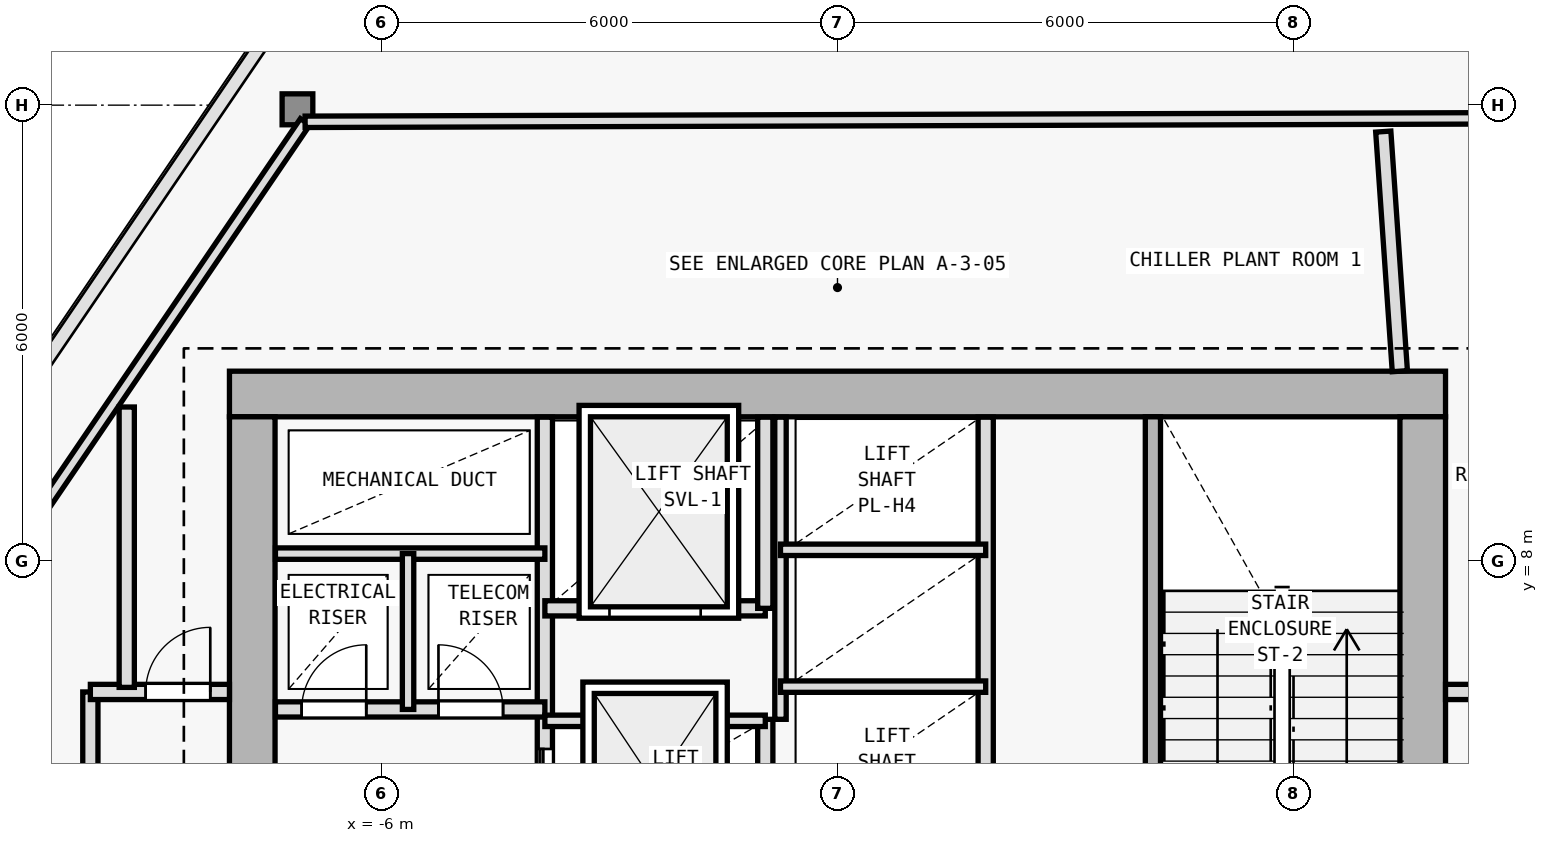
"""IFC4 building model, lengths in metres.
Left out: names, types, materials, properties, quantities, classifications, styles, units other than length and angle.
Written with IfcOpenShell. Run it as: python <this file> out.ifc"""

import sys

from ifc_helpers import new_model, si_unit, direction, frame, frame_2d, origin, origin_2d, place, context, subcontext, project, spatial, rectangle, i_section, extrude, element, fill, save


model = new_model("IFC4")
c1 = context("Model", 3, precision=1e-05, world=origin(), true_north=direction((0.0, 1.0)))
c2 = subcontext(c1, "Body", "Model", "MODEL_VIEW")
j1 = project(units=[si_unit("LENGTHUNIT", "METRE"), si_unit("PLANEANGLEUNIT", "RADIAN")], contexts=[c1])
p1 = place(None, origin())
s1 = spatial("IfcSite", under=j1, at=p1, CompositionType="ELEMENT")
p2 = place(p1, origin())
s2 = spatial("IfcBuilding", under=s1, at=p2, CompositionType="ELEMENT")
p3 = place(p2, frame((0.0, 0.0, 129.3)))
s3 = spatial("IfcBuildingStorey", under=s2, at=p3, CompositionType="ELEMENT", Elevation=129.3)
for number, where, z_axis, x_axis in (
    (1, (7.7, 10.2, 0.0), (0.0, 0.0, 1.0), (1.0, 0.0, 0.0)),
    (2, (-7.7, 10.2, 0.0), (0.0, 0.0, 1.0), (1.0, 0.0, 0.0)),
):
    element("IfcColumn", number, at=place(p3, frame(where, z_axis=z_axis, x_axis=x_axis)), inside=s3, PredefinedType="COLUMN", context=c2, shape_type="SweptSolid", body=[
        extrude(i_section(OverallWidth=0.409, OverallDepth=0.425, WebThickness=0.021, FlangeThickness=0.034, FilletRadius=0.015, at=origin_2d()), origin(), (0.0, 0.0, 1.0), 4.8),
    ])
p4 = place(p3, frame((-7.105, 13.945, 0.005), z_axis=(0.006576109737, -0.001937148605, 0.999976500842), x_axis=(0.282568886397, 0.959247009086, 0.0)))
e3 = element("IfcColumn", 3, at=p4, inside=s3, PredefinedType="COLUMN", context=c2, shape_type="SweptSolid", body=[
    extrude(i_section(OverallWidth=0.404, OverallDepth=0.407, WebThickness=0.017, FlangeThickness=0.028, FilletRadius=0.015, at=origin_2d()), origin(), (0.0, 0.0, 1.0), 4.789),
])
p5 = place(p3, frame((8.0, 10.2, 0.0), z_axis=(0.0, 0.0, 1.0), x_axis=(-1.0, 0.0, 0.0)))
e4 = element("IfcWall", 4, at=p5, inside=s3, PredefinedType="SHEAR", context=c2, shape_type="SweptSolid", body=[
    extrude(rectangle(XDim=16.0, YDim=0.6, at=frame_2d((8.0, 0.0))), origin(), (0.0, 0.0, 1.0), 4.5),
])
p6 = place(p3, frame((-7.7, -9.1, 0.0), z_axis=(0.0, 0.0, 1.0), x_axis=(0.0, 1.0, 0.0)))
e5 = element("IfcWall", 5, at=p6, inside=s3, PredefinedType="SHEAR", context=c2, shape_type="SweptSolid", body=[
    extrude(rectangle(XDim=19.0, YDim=0.6, at=frame_2d((9.5, 0.0))), origin(), (0.0, 0.0, 1.0), 4.5),
])
p7 = place(p6, frame((12.65, 0.0, 0.0)))
e6 = element("IfcOpeningElement", 6, at=p7, cuts=e5, PredefinedType="OPENING", context=c2, shape_type="SweptSolid", body=[
    extrude(rectangle(XDim=1.1, YDim=2.15, at=frame_2d((0.55, 1.075))), frame((0.0, 0.31, 0.0), z_axis=(0.0, -1.0, 0.0), x_axis=(1.0, 0.0, 0.0)), (0.0, 0.0, 1.0), 0.62),
])
p8 = place(p3, frame((7.7, 9.9, 0.0), z_axis=(0.0, 0.0, 1.0), x_axis=(0.0, -1.0, 0.0)))
e7 = element("IfcWall", 7, at=p8, inside=s3, PredefinedType="SHEAR", context=c2, shape_type="SweptSolid", body=[
    extrude(rectangle(XDim=19.0, YDim=0.6, at=frame_2d((9.5, 0.0))), origin(), (0.0, 0.0, 1.0), 4.5),
])
p9 = place(p3, frame((-3.85, 1.35, 0.0), z_axis=(0.0, 0.0, 1.0), x_axis=(0.0, 1.0, 0.0)))
e8 = element("IfcWall", 8, at=p9, inside=s3, PredefinedType="SOLIDWALL", context=c2, shape_type="SweptSolid", body=[
    extrude(rectangle(XDim=8.545, YDim=0.2, at=frame_2d((4.272, 0.0))), origin(), (0.0, 0.0, 1.0), 4.5),
])
p10 = place(p9, frame((1.5, 0.0, 0.0)))
e9 = element("IfcOpeningElement", 9, at=p10, cuts=e8, PredefinedType="OPENING", context=c2, shape_type="SweptSolid", body=[
    extrude(rectangle(XDim=1.0, YDim=2.15, at=frame_2d((0.5, 1.075))), frame((0.0, 0.11, 0.0), z_axis=(0.0, -1.0, 0.0), x_axis=(1.0, 0.0, 0.0)), (0.0, 0.0, 1.0), 0.22),
])
p11 = place(p9, frame((3.18, 0.0, 0.0)))
e10 = element("IfcOpeningElement", 10, at=p11, cuts=e8, PredefinedType="OPENING", context=c2, shape_type="SweptSolid", body=[
    extrude(rectangle(XDim=1.0, YDim=2.15, at=frame_2d((0.5, 1.075))), frame((0.0, 0.11, 0.0), z_axis=(0.0, -1.0, 0.0), x_axis=(1.0, 0.0, 0.0)), (0.0, 0.0, 1.0), 0.22),
])
p12 = place(p3, frame((-7.395, 6.05, 0.0), z_axis=(0.0, 0.0, 1.0), x_axis=(1.0, 0.0, 0.0)))
e11 = element("IfcWall", 11, at=p12, inside=s3, PredefinedType="SOLIDWALL", context=c2, shape_type="SweptSolid", body=[
    extrude(rectangle(XDim=3.545, YDim=0.2, at=frame_2d((1.772, 0.0))), origin(), (0.0, 0.0, 1.0), 4.5),
])
p13 = place(p12, frame((0.345, 0.0, 0.0)))
e12 = element("IfcOpeningElement", 12, at=p13, cuts=e11, PredefinedType="OPENING", context=c2, shape_type="SweptSolid", body=[
    extrude(rectangle(XDim=0.85, YDim=2.1, at=frame_2d((0.425, 1.05))), frame((0.0, 0.11, 0.0), z_axis=(0.0, -1.0, 0.0), x_axis=(1.0, 0.0, 0.0)), (0.0, 0.0, 1.0), 0.22),
])
p14 = place(p12, frame((2.145, 0.0, 0.0)))
e13 = element("IfcOpeningElement", 13, at=p14, cuts=e11, PredefinedType="OPENING", context=c2, shape_type="SweptSolid", body=[
    extrude(rectangle(XDim=0.85, YDim=2.1, at=frame_2d((0.425, 1.05))), frame((0.0, 0.11, 0.0), z_axis=(0.0, -1.0, 0.0), x_axis=(1.0, 0.0, 0.0)), (0.0, 0.0, 1.0), 0.22),
])
p15 = place(p3, frame((-7.395, 8.1, 0.0), z_axis=(0.0, 0.0, 1.0), x_axis=(1.0, 0.0, 0.0)))
e14 = element("IfcWall", 14, at=p15, inside=s3, PredefinedType="PARTITIONING", context=c2, shape_type="SweptSolid", body=[
    extrude(rectangle(XDim=3.545, YDim=0.15, at=frame_2d((1.772, 0.0))), origin(), (0.0, 0.0, 1.0), 4.5),
])
p16 = place(p3, frame((-5.65, 6.05, 0.0), z_axis=(0.0, 0.0, 1.0), x_axis=(0.0, 1.0, 0.0)))
e15 = element("IfcWall", 15, at=p16, inside=s3, PredefinedType="PARTITIONING", context=c2, shape_type="SweptSolid", body=[
    extrude(rectangle(XDim=2.05, YDim=0.15, at=frame_2d((1.025, 0.0))), origin(), (0.0, 0.0, 1.0), 4.5),
])
p17 = place(p3, frame((4.15, 2.75, 0.0), z_axis=(0.0, 0.0, 1.0), x_axis=(0.0, 1.0, 0.0)))
e16 = element("IfcWall", 16, at=p17, inside=s3, PredefinedType="SOLIDWALL", context=c2, shape_type="SweptSolid", body=[
    extrude(rectangle(XDim=7.15, YDim=0.2, at=frame_2d((3.575, 0.0))), origin(), (0.0, 0.0, 1.0), 4.5),
])
p18 = place(p17, frame((0.35, 0.0, 0.0)))
e17 = element("IfcOpeningElement", 17, at=p18, cuts=e16, PredefinedType="OPENING", context=c2, shape_type="SweptSolid", body=[
    extrude(rectangle(XDim=1.0, YDim=2.15, at=frame_2d((0.5, 1.075))), frame((0.0, 0.11, 0.0), z_axis=(0.0, -1.0, 0.0), x_axis=(1.0, 0.0, 0.0)), (0.0, 0.0, 1.0), 0.22),
])
p19 = place(p3, frame((-0.95, 2.65, 0.0), z_axis=(0.0, 0.0, 1.0), x_axis=(0.0, 1.0, 0.0)))
e18 = element("IfcWall", 18, at=p19, inside=s3, PredefinedType="SOLIDWALL", context=c2, shape_type="SweptSolid", body=[
    extrude(rectangle(XDim=3.27, YDim=0.2, at=frame_2d((1.635, 0.0))), origin(), (0.0, 0.0, 1.0), 4.5),
])
p20 = place(p3, frame((-3.85, 5.9, 0.0), z_axis=(0.0, 0.0, 1.0), x_axis=(1.0, 0.0, 0.0)))
e19 = element("IfcWall", 19, at=p20, inside=s3, PredefinedType="PARTITIONING", context=c2, shape_type="SweptSolid", body=[
    extrude(rectangle(XDim=2.9, YDim=0.15, at=frame_2d((1.45, 0.0))), origin(), (0.0, 0.0, 1.0), 4.5),
])
p21 = place(p3, frame((-3.85, 7.38, 0.0), z_axis=(0.0, 0.0, 1.0), x_axis=(1.0, 0.0, 0.0)))
e20 = element("IfcWall", 20, at=p21, inside=s3, PredefinedType="SOLIDWALL", context=c2, shape_type="SweptSolid", body=[
    extrude(rectangle(XDim=2.9, YDim=0.2, at=frame_2d((1.45, 0.0))), origin(), (0.0, 0.0, 1.0), 4.5),
])
p22 = place(p21, frame((0.85, 0.0, 0.0)))
e21 = element("IfcOpeningElement", 21, at=p22, cuts=e20, PredefinedType="OPENING", context=c2, shape_type="SweptSolid", body=[
    extrude(rectangle(XDim=1.2, YDim=2.2, at=frame_2d((0.6, 1.1))), frame((0.0, 0.11, 0.0), z_axis=(0.0, -1.0, 0.0), x_axis=(1.0, 0.0, 0.0)), (0.0, 0.0, 1.0), 0.22),
])
p23 = place(p3, frame((-0.95, 7.38, 0.0), z_axis=(0.0, 0.0, 1.0), x_axis=(0.0, 1.0, 0.0)))
e22 = element("IfcWall", 22, at=p23, inside=s3, PredefinedType="SOLIDWALL", context=c2, shape_type="SweptSolid", body=[
    extrude(rectangle(XDim=2.515, YDim=0.2, at=frame_2d((1.258, 0.0))), origin(), (0.0, 0.0, 1.0), 4.5),
])
p24 = place(p3, frame((1.95, 2.65, 0.0), z_axis=(0.0, 0.0, 1.0), x_axis=(0.0, 1.0, 0.0)))
e23 = element("IfcWall", 23, at=p24, inside=s3, PredefinedType="SOLIDWALL", context=c2, shape_type="SweptSolid", body=[
    extrude(rectangle(XDim=7.245, YDim=0.2, at=frame_2d((3.623, 0.0))), origin(), (0.0, 0.0, 1.0), 4.5),
])
p25 = place(p3, frame((-0.75, 5.92, 0.0), z_axis=(0.0, 0.0, 1.0), x_axis=(0.0, 1.0, 0.0)))
e24 = element("IfcWall", 24, at=p25, inside=s3, PredefinedType="PARTITIONING", context=c2, shape_type="SweptSolid", body=[
    extrude(rectangle(XDim=3.975, YDim=0.15, at=frame_2d((1.988, 0.0))), origin(), (0.0, 0.0, 1.0), 4.5),
])
for number, where, z_axis, x_axis in (
    (25, (-0.75, 6.35, 0.0), (0.0, 0.0, 1.0), (1.0, 0.0, 0.0)),
    (26, (-0.75, 8.15, 0.0), (0.0, 0.0, 1.0), (1.0, 0.0, 0.0)),
):
    element("IfcWall", number, at=place(p3, frame(where, z_axis=z_axis, x_axis=x_axis)), inside=s3, PredefinedType="PARTITIONING", context=c2, shape_type="SweptSolid", body=[
        extrude(rectangle(XDim=2.7, YDim=0.15, at=frame_2d((1.35, 0.0))), origin(), (0.0, 0.0, 1.0), 4.5),
    ])
p26 = place(p3, frame((-14.31, 3.042, 0.0), z_axis=(0.0, 0.0, 1.0), x_axis=(0.562466830755, 0.826819849968, 0.0)))
e27 = element("IfcWall", 27, at=p26, inside=s3, PredefinedType="PARTITIONING", context=c2, shape_type="SweptSolid", body=[
    extrude(rectangle(XDim=12.988, YDim=0.15, at=frame_2d((6.494, 0.0))), origin(), (0.0, 0.0, 1.0), 4.035),
])
p27 = place(p3, frame((-7.004, 13.781, 0.0), z_axis=(0.0, 0.0, 1.0), x_axis=(0.999995800217, 0.002898197411, 0.0)))
e28 = element("IfcWall", 28, at=p27, inside=s3, PredefinedType="PARTITIONING", context=c2, shape_type="SweptSolid", body=[
    extrude(rectangle(XDim=16.595, YDim=0.15, at=frame_2d((8.297, 0.0))), origin(), (0.0, 0.0, 1.0), 4.035),
])
p28 = place(p3, frame((-9.83, -11.53, 0.0), z_axis=(0.0, 0.0, 1.0), x_axis=(0.0, 1.0, 0.0)))
e29 = element("IfcWall", 29, at=p28, inside=s3, PredefinedType="SOLIDWALL", context=c2, shape_type="SweptSolid", body=[
    extrude(rectangle(XDim=17.81, YDim=0.2, at=frame_2d((8.905, 0.0))), origin(), (0.0, 0.0, 1.0), 3.875),
])
p29 = place(p28, frame((4.492, 0.0, 0.0)))
e30 = element("IfcOpeningElement", 30, at=p29, cuts=e29, PredefinedType="OPENING", context=c2, shape_type="SweptSolid", body=[
    extrude(rectangle(XDim=1.0, YDim=2.15, at=frame_2d((0.5, 1.075))), frame((0.0, 0.11, 0.0), z_axis=(0.0, -1.0, 0.0), x_axis=(1.0, 0.0, 0.0)), (0.0, 0.0, 1.0), 0.22),
])
p30 = place(p28, frame((13.244, 0.0, 0.0)))
e31 = element("IfcOpeningElement", 31, at=p30, cuts=e29, PredefinedType="OPENING", context=c2, shape_type="SweptSolid", body=[
    extrude(rectangle(XDim=1.0, YDim=2.15, at=frame_2d((0.5, 1.075))), frame((0.0, 0.11, 0.0), z_axis=(0.0, -1.0, 0.0), x_axis=(1.0, 0.0, 0.0)), (0.0, 0.0, 1.0), 0.22),
])
p31 = place(p3, frame((-9.83, 6.28, 0.0), z_axis=(0.0, 0.0, 1.0), x_axis=(1.0, 0.0, 0.0)))
e32 = element("IfcWall", 32, at=p31, inside=s3, PredefinedType="SOLIDWALL", context=c2, shape_type="SweptSolid", body=[
    extrude(rectangle(XDim=1.83, YDim=0.2, at=frame_2d((0.915, 0.0))), origin(), (0.0, 0.0, 1.0), 4.175),
])
p32 = place(p31, frame((0.728, 0.0, 0.0)))
e33 = element("IfcOpeningElement", 33, at=p32, cuts=e32, PredefinedType="OPENING", context=c2, shape_type="SweptSolid", body=[
    extrude(rectangle(XDim=0.85, YDim=2.1, at=frame_2d((0.425, 1.05))), frame((0.0, 0.11, 0.0), z_axis=(0.0, -1.0, 0.0), x_axis=(1.0, 0.0, 0.0)), (0.0, 0.0, 1.0), 0.22),
])
p33 = place(p3, frame((8.0, 6.28, 0.0), z_axis=(0.0, 0.0, 1.0), x_axis=(1.0, 0.0, 0.0)))
e34 = element("IfcWall", 34, at=p33, inside=s3, PredefinedType="SOLIDWALL", context=c2, shape_type="SweptSolid", body=[
    extrude(rectangle(XDim=1.83, YDim=0.2, at=frame_2d((0.915, 0.0))), origin(), (0.0, 0.0, 1.0), 4.5),
])
p34 = place(p33, frame((0.365, 0.0, 0.0)))
e35 = element("IfcOpeningElement", 35, at=p34, cuts=e34, PredefinedType="OPENING", context=c2, shape_type="SweptSolid", body=[
    extrude(rectangle(XDim=0.85, YDim=2.1, at=frame_2d((0.425, 1.05))), frame((0.0, 0.11, 0.0), z_axis=(0.0, -1.0, 0.0), x_axis=(1.0, 0.0, 0.0)), (0.0, 0.0, 1.0), 0.22),
])
p35 = place(p3, frame((7.399, 10.5, 0.0), z_axis=(0.0, 0.0, 1.0), x_axis=(-0.06892407576, 0.99762190823, 0.0)))
e36 = element("IfcWall", 36, at=p35, inside=s3, PredefinedType="SOLIDWALL", context=c2, shape_type="SweptSolid", body=[
    extrude(rectangle(XDim=3.16, YDim=0.2, at=frame_2d((1.58, 0.0))), origin(), (0.0, 0.0, 1.0), 4.5),
])
p36 = place(p3, frame((-9.351, 6.34, 0.0), z_axis=(0.0, 0.0, 1.0), x_axis=(0.0, 1.0, 0.0)))
e37 = element("IfcWall", 37, at=p36, inside=s3, PredefinedType="SOLIDWALL", context=c2, shape_type="SweptSolid", body=[
    extrude(rectangle(XDim=3.689, YDim=0.2, at=frame_2d((1.844, 0.0))), origin(), (0.0, 0.0, 1.0), 4.175),
])
p37 = place(p13, origin())
e38 = element("IfcDoor", 38, at=p37, inside=s3, OperationType="SINGLE_SWING_RIGHT", PredefinedType="DOOR", context=c2, shape_type="SweptSolid", body=[
    extrude(rectangle(XDim=0.85, YDim=2.1, at=frame_2d((0.425, 1.05))), frame((0.0, 0.025, 0.0), z_axis=(0.0, -1.0, 0.0), x_axis=(1.0, 0.0, 0.0)), (0.0, 0.0, 1.0), 0.05),
])
fill(e12, e38)
p38 = place(p14, origin())
e39 = element("IfcDoor", 39, at=p38, inside=s3, OperationType="SINGLE_SWING_LEFT", PredefinedType="DOOR", context=c2, shape_type="SweptSolid", body=[
    extrude(rectangle(XDim=0.85, YDim=2.1, at=frame_2d((0.425, 1.05))), frame((0.0, 0.025, 0.0), z_axis=(0.0, -1.0, 0.0), x_axis=(1.0, 0.0, 0.0)), (0.0, 0.0, 1.0), 0.05),
])
fill(e13, e39)
p39 = place(p22, origin())
e40 = element("IfcDoor", 40, at=p39, inside=s3, OperationType="DOUBLE_DOOR_SLIDING", PredefinedType="DOOR", context=c2, shape_type="SweptSolid", body=[
    extrude(rectangle(XDim=1.2, YDim=2.2, at=frame_2d((0.6, 1.1))), frame((0.0, 0.025, 0.0), z_axis=(0.0, -1.0, 0.0), x_axis=(1.0, 0.0, 0.0)), (0.0, 0.0, 1.0), 0.05),
])
fill(e21, e40)
p40 = place(p11, origin())
e41 = element("IfcDoor", 41, at=p40, inside=s3, OperationType="DOUBLE_DOOR_SLIDING", PredefinedType="DOOR", context=c2, shape_type="SweptSolid", body=[
    extrude(rectangle(XDim=1.0, YDim=2.15, at=frame_2d((0.5, 1.075))), frame((0.0, 0.025, 0.0), z_axis=(0.0, -1.0, 0.0), x_axis=(1.0, 0.0, 0.0)), (0.0, 0.0, 1.0), 0.05),
])
fill(e10, e41)
p41 = place(p32, origin())
e42 = element("IfcDoor", 42, at=p41, inside=s3, OperationType="SINGLE_SWING_RIGHT", PredefinedType="DOOR", context=c2, shape_type="SweptSolid", body=[
    extrude(rectangle(XDim=0.85, YDim=2.1, at=frame_2d((0.425, 1.05))), frame((0.0, 0.025, 0.0), z_axis=(0.0, -1.0, 0.0), x_axis=(1.0, 0.0, 0.0)), (0.0, 0.0, 1.0), 0.05),
])
fill(e33, e42)
save(model, sys.argv[1])
